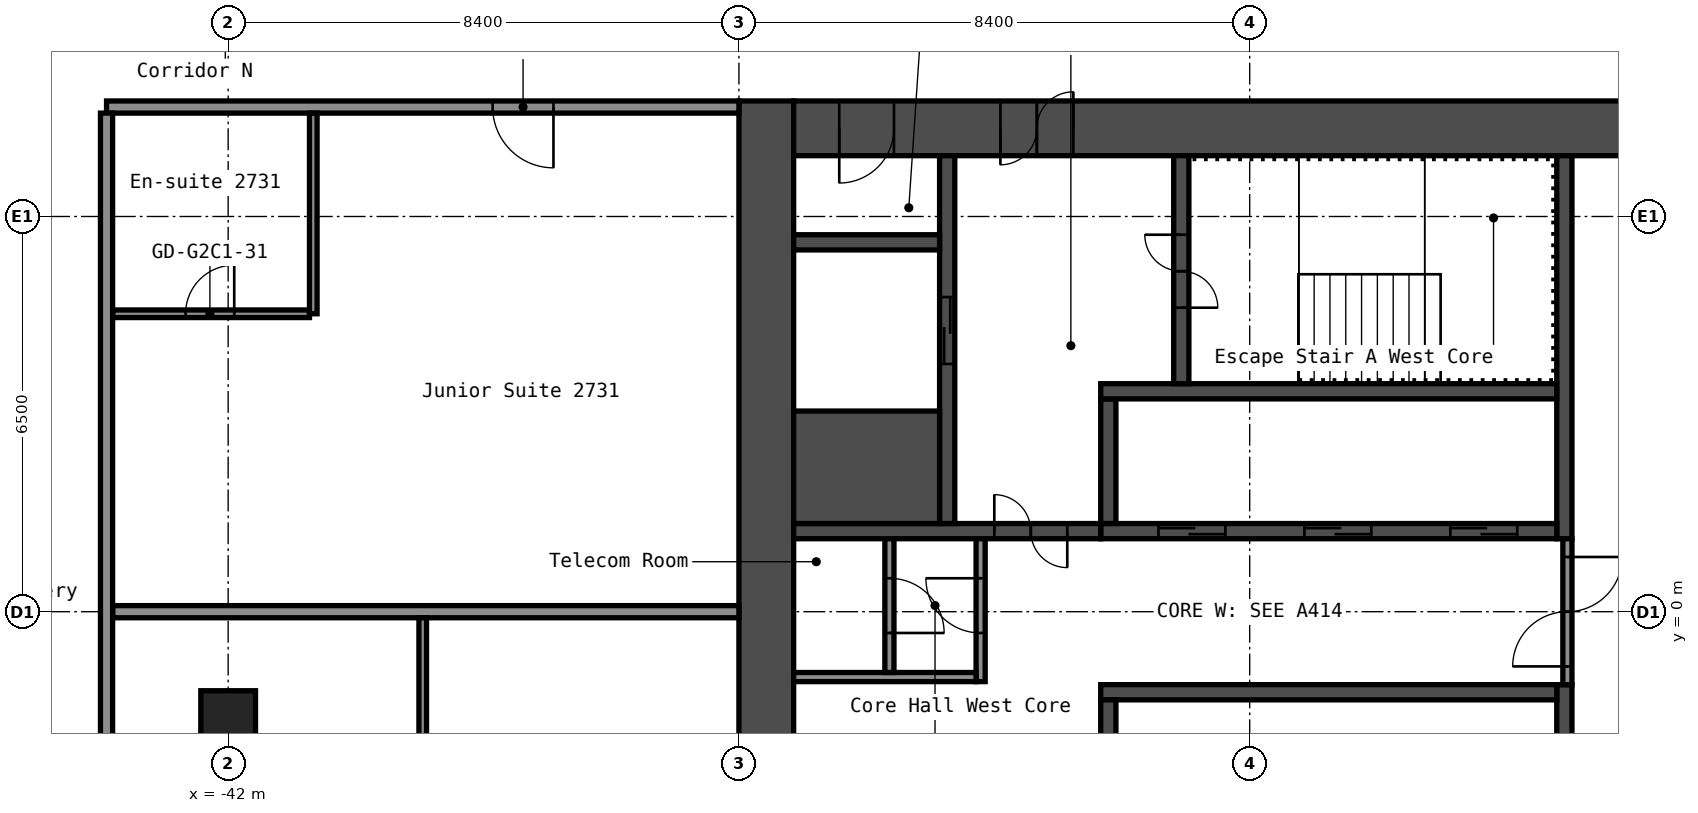
"""IFC4 building model, lengths in metres.
Left out: names, types, materials, properties, quantities, classifications, styles, units other than length and angle.
Written with IfcOpenShell. Run it as: python <this file> out.ifc"""

import sys

from ifc_helpers import new_model, si_unit, direction, frame, frame_2d, origin, origin_2d, place, context, subcontext, project, spatial, rectangle, hollow_rectangle, extrude, element, fill, save


model = new_model("IFC4")
c1 = context("Model", 3, precision=1e-05, world=origin(), true_north=direction((0.0, 1.0)))
c2 = subcontext(c1, "Body", "Model", "MODEL_VIEW")
j1 = project(units=[si_unit("LENGTHUNIT", "METRE"), si_unit("PLANEANGLEUNIT", "RADIAN")], contexts=[c1])
p1 = place(None, origin())
s1 = spatial("IfcSite", under=j1, at=p1, CompositionType="ELEMENT")
p2 = place(p1, origin())
s2 = spatial("IfcBuilding", under=s1, at=p2, CompositionType="ELEMENT")
p3 = place(p2, frame((0.0, 0.0, 97.8)))
s3 = spatial("IfcBuildingStorey", under=s2, at=p3, CompositionType="ELEMENT", Elevation=97.8)
p4 = place(p3, frame((-42.0, -1.75, 0.0), z_axis=(0.0, 0.0, 1.0), x_axis=(1.0, 0.0, 0.0)))
e1 = element("IfcColumn", 1, at=p4, inside=s3, PredefinedType="COLUMN", context=c2, shape_type="SweptSolid", body=[
    extrude(hollow_rectangle(XDim=0.9, YDim=0.9, WallThickness=0.036, at=origin_2d()), origin(), (0.0, 0.0, 1.0), 2.8),
])
p5 = place(p3, frame((-33.15, -8.4, 0.0), z_axis=(0.0, 0.0, 1.0), x_axis=(0.0, 1.0, 0.0)))
e2 = element("IfcWall", 2, at=p5, inside=s3, PredefinedType="SHEAR", context=c2, shape_type="SweptSolid", body=[
    extrude(rectangle(XDim=16.8, YDim=0.9, at=frame_2d((8.4, 0.0))), origin(), (0.0, 0.0, 1.0), 2.8),
])
p6 = place(p3, frame((-32.7, 7.95, 0.0), z_axis=(0.0, 0.0, 1.0), x_axis=(1.0, 0.0, 0.0)))
e3 = element("IfcWall", 3, at=p6, inside=s3, PredefinedType="SHEAR", context=c2, shape_type="SweptSolid", body=[
    extrude(rectangle(XDim=15.0, YDim=0.9, at=frame_2d((7.5, 0.0))), origin(), (0.0, 0.0, 1.0), 2.8),
])
p7 = place(p6, frame((3.4, 0.0, 0.0)))
e4 = element("IfcOpeningElement", 4, at=p7, cuts=e3, PredefinedType="OPENING", context=c2, shape_type="SweptSolid", body=[
    extrude(rectangle(XDim=1.2, YDim=2.1, at=frame_2d((0.6, 1.05))), frame((0.0, 0.46, 0.0), z_axis=(0.0, -1.0, 0.0), x_axis=(1.0, 0.0, 0.0)), (0.0, 0.0, 1.0), 0.92),
])
p8 = place(p6, frame((0.75, 0.0, 0.0)))
e5 = element("IfcOpeningElement", 5, at=p8, cuts=e3, PredefinedType="OPENING", context=c2, shape_type="SweptSolid", body=[
    extrude(rectangle(XDim=0.9, YDim=2.1, at=frame_2d((0.45, 1.05))), frame((0.0, 0.46, 0.0), z_axis=(0.0, -1.0, 0.0), x_axis=(1.0, 0.0, 0.0)), (0.0, 0.0, 1.0), 0.92),
])
p9 = place(p3, frame((-20.025, 1.2, 0.0), z_axis=(0.0, 0.0, 1.0), x_axis=(0.0, 1.0, 0.0)))
e6 = element("IfcWall", 6, at=p9, inside=s3, PredefinedType="SHEAR", context=c2, shape_type="SweptSolid", body=[
    extrude(rectangle(XDim=6.3, YDim=0.25, at=frame_2d((3.15, 0.0))), origin(), (0.0, 0.0, 1.0), 2.8),
])
p10 = place(p3, frame((-20.025, -7.5, 0.0), z_axis=(0.0, 0.0, 1.0), x_axis=(0.0, 1.0, 0.0)))
e7 = element("IfcWall", 7, at=p10, inside=s3, PredefinedType="SHEAR", context=c2, shape_type="SweptSolid", body=[
    extrude(rectangle(XDim=6.3, YDim=0.25, at=frame_2d((3.15, 0.0))), origin(), (0.0, 0.0, 1.0), 2.8),
])
p11 = place(p10, frame((2.4, 0.0, 0.0)))
e8 = element("IfcOpeningElement", 8, at=p11, cuts=e7, PredefinedType="OPENING", context=c2, shape_type="SweptSolid", body=[
    extrude(rectangle(XDim=1.0, YDim=2.1, at=frame_2d((0.5, 1.05))), frame((0.0, 0.135, 0.0), z_axis=(0.0, -1.0, 0.0), x_axis=(1.0, 0.0, 0.0)), (0.0, 0.0, 1.0), 0.27),
])
p12 = place(p3, frame((-27.65, 1.325, 0.0), z_axis=(0.0, 0.0, 1.0), x_axis=(1.0, 0.0, 0.0)))
e9 = element("IfcWall", 9, at=p12, inside=s3, PredefinedType="SHEAR", context=c2, shape_type="SweptSolid", body=[
    extrude(rectangle(XDim=7.5, YDim=0.25, at=frame_2d((3.75, 0.0))), origin(), (0.0, 0.0, 1.0), 2.8),
])
p13 = place(p12, frame((5.75, 0.0, 0.0)))
e10 = element("IfcOpeningElement", 10, at=p13, cuts=e9, PredefinedType="OPENING", context=c2, shape_type="SweptSolid", body=[
    extrude(rectangle(XDim=1.1, YDim=2.1, at=frame_2d((0.55, 1.05))), frame((0.0, 0.135, 0.0), z_axis=(0.0, -1.0, 0.0), x_axis=(1.0, 0.0, 0.0)), (0.0, 0.0, 1.0), 0.27),
])
p14 = place(p12, frame((3.35, 0.0, 0.0)))
e11 = element("IfcOpeningElement", 11, at=p14, cuts=e9, PredefinedType="OPENING", context=c2, shape_type="SweptSolid", body=[
    extrude(rectangle(XDim=1.1, YDim=2.1, at=frame_2d((0.55, 1.05))), frame((0.0, 0.135, 0.0), z_axis=(0.0, -1.0, 0.0), x_axis=(1.0, 0.0, 0.0)), (0.0, 0.0, 1.0), 0.27),
])
p15 = place(p12, frame((0.95, 0.0, 0.0)))
e12 = element("IfcOpeningElement", 12, at=p15, cuts=e9, PredefinedType="OPENING", context=c2, shape_type="SweptSolid", body=[
    extrude(rectangle(XDim=1.1, YDim=2.1, at=frame_2d((0.55, 1.05))), frame((0.0, 0.135, 0.0), z_axis=(0.0, -1.0, 0.0), x_axis=(1.0, 0.0, 0.0)), (0.0, 0.0, 1.0), 0.27),
])
p16 = place(p3, frame((-27.525, 1.45, 0.0), z_axis=(0.0, 0.0, 1.0), x_axis=(0.0, 1.0, 0.0)))
e13 = element("IfcWall", 13, at=p16, inside=s3, PredefinedType="SHEAR", context=c2, shape_type="SweptSolid", body=[
    extrude(rectangle(XDim=2.05, YDim=0.25, at=frame_2d((1.025, 0.0))), origin(), (0.0, 0.0, 1.0), 2.8),
])
p17 = place(p3, frame((-27.65, 3.625, 0.0), z_axis=(0.0, 0.0, 1.0), x_axis=(1.0, 0.0, 0.0)))
e14 = element("IfcWall", 14, at=p17, inside=s3, PredefinedType="SHEAR", context=c2, shape_type="SweptSolid", body=[
    extrude(rectangle(XDim=7.5, YDim=0.25, at=frame_2d((3.75, 0.0))), origin(), (0.0, 0.0, 1.0), 2.8),
])
p18 = place(p3, frame((-26.325, 3.75, 0.0), z_axis=(0.0, 0.0, 1.0), x_axis=(0.0, 1.0, 0.0)))
e15 = element("IfcWall", 15, at=p18, inside=s3, PredefinedType="SHEAR", context=c2, shape_type="SweptSolid", body=[
    extrude(rectangle(XDim=3.75, YDim=0.25, at=frame_2d((1.875, 0.0))), origin(), (0.0, 0.0, 1.0), 2.8),
])
p19 = place(p18, frame((1.25, 0.0, 0.0)))
e16 = element("IfcOpeningElement", 16, at=p19, cuts=e15, PredefinedType="OPENING", context=c2, shape_type="SweptSolid", body=[
    extrude(rectangle(XDim=1.2, YDim=2.1, at=frame_2d((0.6, 1.05))), frame((0.0, 0.135, 0.0), z_axis=(0.0, -1.0, 0.0), x_axis=(1.0, 0.0, 0.0)), (0.0, 0.0, 1.0), 0.27),
])
p20 = place(p3, frame((-32.7, 1.325, 0.0), z_axis=(0.0, 0.0, 1.0), x_axis=(1.0, 0.0, 0.0)))
e17 = element("IfcWall", 17, at=p20, inside=s3, PredefinedType="SHEAR", context=c2, shape_type="SweptSolid", body=[
    extrude(rectangle(XDim=5.05, YDim=0.25, at=frame_2d((2.525, 0.0))), origin(), (0.0, 0.0, 1.0), 2.8),
])
p21 = place(p20, frame((3.3, 0.0, 0.0)))
e18 = element("IfcOpeningElement", 18, at=p21, cuts=e17, PredefinedType="OPENING", context=c2, shape_type="SweptSolid", body=[
    extrude(rectangle(XDim=1.2, YDim=2.1, at=frame_2d((0.6, 1.05))), frame((0.0, 0.135, 0.0), z_axis=(0.0, -1.0, 0.0), x_axis=(1.0, 0.0, 0.0)), (0.0, 0.0, 1.0), 0.27),
])
p22 = place(p3, frame((-30.175, 1.45, 0.0), z_axis=(0.0, 0.0, 1.0), x_axis=(0.0, 1.0, 0.0)))
e19 = element("IfcWall", 19, at=p22, inside=s3, PredefinedType="SHEAR", context=c2, shape_type="SweptSolid", body=[
    extrude(rectangle(XDim=6.05, YDim=0.25, at=frame_2d((3.025, 0.0))), origin(), (0.0, 0.0, 1.0), 2.8),
])
p23 = place(p22, frame((2.625, 0.0, 0.0)))
e20 = element("IfcOpeningElement", 20, at=p23, cuts=e19, PredefinedType="OPENING", context=c2, shape_type="SweptSolid", body=[
    extrude(rectangle(XDim=1.1, YDim=2.1, at=frame_2d((0.55, 1.05))), frame((0.0, 0.135, 0.0), z_axis=(0.0, -1.0, 0.0), x_axis=(1.0, 0.0, 0.0)), (0.0, 0.0, 1.0), 0.27),
])
p24 = place(p3, frame((-32.7, 2.375, 0.0), z_axis=(0.0, 0.0, 1.0), x_axis=(1.0, 0.0, 0.0)))
e21 = element("IfcWall", 21, at=p24, inside=s3, PredefinedType="SHEAR", context=c2, shape_type="SweptSolid", body=[
    extrude(rectangle(XDim=2.4, YDim=1.85, at=frame_2d((1.2, 0.0))), origin(), (0.0, 0.0, 1.0), 2.8),
])
p25 = place(p3, frame((-32.7, 6.075, 0.0), z_axis=(0.0, 0.0, 1.0), x_axis=(1.0, 0.0, 0.0)))
e22 = element("IfcWall", 22, at=p25, inside=s3, PredefinedType="SHEAR", context=c2, shape_type="SweptSolid", body=[
    extrude(rectangle(XDim=2.4, YDim=0.25, at=frame_2d((1.2, 0.0))), origin(), (0.0, 0.0, 1.0), 2.8),
])
p26 = place(p3, frame((-27.65, -1.325, 0.0), z_axis=(0.0, 0.0, 1.0), x_axis=(1.0, 0.0, 0.0)))
e23 = element("IfcWall", 23, at=p26, inside=s3, PredefinedType="SHEAR", context=c2, shape_type="SweptSolid", body=[
    extrude(rectangle(XDim=7.5, YDim=0.25, at=frame_2d((3.75, 0.0))), origin(), (0.0, 0.0, 1.0), 2.8),
])
p27 = place(p3, frame((-27.525, -3.5, 0.0), z_axis=(0.0, 0.0, 1.0), x_axis=(0.0, 1.0, 0.0)))
e24 = element("IfcWall", 24, at=p27, inside=s3, PredefinedType="SHEAR", context=c2, shape_type="SweptSolid", body=[
    extrude(rectangle(XDim=2.05, YDim=0.25, at=frame_2d((1.025, 0.0))), origin(), (0.0, 0.0, 1.0), 2.8),
])
p28 = place(p3, frame((-19.975, -1.2, 0.0), z_axis=(0.0, 0.0, 1.0), x_axis=(0.0, 1.0, 0.0)))
e25 = element("IfcWall", 25, at=p28, inside=s3, PredefinedType="PARTITIONING", context=c2, shape_type="SweptSolid", body=[
    extrude(rectangle(XDim=2.4, YDim=0.15, at=frame_2d((1.2, 0.0))), origin(), (0.0, 0.0, 1.0), 2.8),
])
p29 = place(p28, frame((0.3, 0.0, 0.0)))
e26 = element("IfcOpeningElement", 26, at=p29, cuts=e25, PredefinedType="OPENING", context=c2, shape_type="SweptSolid", body=[
    extrude(rectangle(XDim=1.8, YDim=2.1, at=frame_2d((0.9, 1.05))), frame((0.0, 0.085, 0.0), z_axis=(0.0, -1.0, 0.0), x_axis=(1.0, 0.0, 0.0)), (0.0, 0.0, 1.0), 0.17),
])
p30 = place(p3, frame((-29.625, -1.15, 0.0), z_axis=(0.0, 0.0, 1.0), x_axis=(0.0, 1.0, 0.0)))
e27 = element("IfcWall", 27, at=p30, inside=s3, PredefinedType="PARTITIONING", context=c2, shape_type="SweptSolid", body=[
    extrude(rectangle(XDim=2.35, YDim=0.15, at=frame_2d((1.175, 0.0))), origin(), (0.0, 0.0, 1.0), 2.8),
])
p31 = place(p30, frame((0.8, 0.0, 0.0)))
e28 = element("IfcOpeningElement", 28, at=p31, cuts=e27, PredefinedType="OPENING", context=c2, shape_type="SweptSolid", body=[
    extrude(rectangle(XDim=0.9, YDim=2.1, at=frame_2d((0.45, 1.05))), frame((0.0, 0.085, 0.0), z_axis=(0.0, -1.0, 0.0), x_axis=(1.0, 0.0, 0.0)), (0.0, 0.0, 1.0), 0.17),
])
p32 = place(p3, frame((-32.7, -1.075, 0.0), z_axis=(0.0, 0.0, 1.0), x_axis=(1.0, 0.0, 0.0)))
e29 = element("IfcWall", 29, at=p32, inside=s3, PredefinedType="PARTITIONING", context=c2, shape_type="SweptSolid", body=[
    extrude(rectangle(XDim=3.0, YDim=0.15, at=frame_2d((1.5, 0.0))), origin(), (0.0, 0.0, 1.0), 2.8),
])
p33 = place(p3, frame((-31.125, -1.0, 0.0), z_axis=(0.0, 0.0, 1.0), x_axis=(0.0, 1.0, 0.0)))
e30 = element("IfcWall", 30, at=p33, inside=s3, PredefinedType="PARTITIONING", context=c2, shape_type="SweptSolid", body=[
    extrude(rectangle(XDim=2.2, YDim=0.15, at=frame_2d((1.1, 0.0))), origin(), (0.0, 0.0, 1.0), 2.8),
])
p34 = place(p33, frame((0.65, 0.0, 0.0)))
e31 = element("IfcOpeningElement", 31, at=p34, cuts=e30, PredefinedType="OPENING", context=c2, shape_type="SweptSolid", body=[
    extrude(rectangle(XDim=0.9, YDim=2.1, at=frame_2d((0.45, 1.05))), frame((0.0, 0.085, 0.0), z_axis=(0.0, -1.0, 0.0), x_axis=(1.0, 0.0, 0.0)), (0.0, 0.0, 1.0), 0.17),
])
p35 = place(p3, frame((-43.9, 0.0, 0.0), z_axis=(0.0, 0.0, 1.0), x_axis=(1.0, 0.0, 0.0)))
e32 = element("IfcWall", 32, at=p35, inside=s3, PredefinedType="PARTITIONING", context=c2, shape_type="SweptSolid", body=[
    extrude(rectangle(XDim=10.3, YDim=0.2, at=frame_2d((5.15, 0.0))), origin(), (0.0, 0.0, 1.0), 2.8),
])
p36 = place(p3, frame((-43.9, 4.9, 0.0), z_axis=(0.0, 0.0, 1.0), x_axis=(1.0, 0.0, 0.0)))
e33 = element("IfcWall", 33, at=p36, inside=s3, PredefinedType="PARTITIONING", context=c2, shape_type="SweptSolid", body=[
    extrude(rectangle(XDim=3.237, YDim=0.125, at=frame_2d((1.619, 0.0))), origin(), (0.0, 0.0, 1.0), 2.8),
])
p37 = place(p36, frame((1.2, 0.0, 0.0)))
e34 = element("IfcOpeningElement", 34, at=p37, cuts=e33, PredefinedType="OPENING", context=c2, shape_type="SweptSolid", body=[
    extrude(rectangle(XDim=0.8, YDim=2.1, at=frame_2d((0.4, 1.05))), frame((0.0, 0.073, 0.0), z_axis=(0.0, -1.0, 0.0), x_axis=(1.0, 0.0, 0.0)), (0.0, 0.0, 1.0), 0.145),
])
p38 = place(p3, frame((-44.0, 8.3, 0.0), z_axis=(0.0, 0.0, 1.0), x_axis=(1.0, 0.0, 0.0)))
e35 = element("IfcWall", 35, at=p38, inside=s3, PredefinedType="PARTITIONING", context=c2, shape_type="SweptSolid", body=[
    extrude(rectangle(XDim=10.4, YDim=0.2, at=frame_2d((5.2, 0.0))), origin(), (0.0, 0.0, 1.0), 2.8),
])
p39 = place(p38, frame((6.35, 0.0, 0.0)))
e36 = element("IfcOpeningElement", 36, at=p39, cuts=e35, PredefinedType="OPENING", context=c2, shape_type="SweptSolid", body=[
    extrude(rectangle(XDim=1.0, YDim=2.1, at=frame_2d((0.5, 1.05))), frame((0.0, 0.11, 0.0), z_axis=(0.0, -1.0, 0.0), x_axis=(1.0, 0.0, 0.0)), (0.0, 0.0, 1.0), 0.22),
])
p40 = place(p3, frame((-44.0, -8.2, 0.0), z_axis=(0.0, 0.0, 1.0), x_axis=(0.0, 1.0, 0.0)))
e37 = element("IfcWall", 37, at=p40, inside=s3, PredefinedType="PARTITIONING", context=c2, shape_type="SweptSolid", body=[
    extrude(rectangle(XDim=16.4, YDim=0.2, at=frame_2d((8.2, 0.0))), origin(), (0.0, 0.0, 1.0), 2.8),
])
p41 = place(p3, frame((-40.6, 4.9, 0.0), z_axis=(0.0, 0.0, 1.0), x_axis=(0.0, 1.0, 0.0)))
e38 = element("IfcWall", 38, at=p41, inside=s3, PredefinedType="PARTITIONING", context=c2, shape_type="SweptSolid", body=[
    extrude(rectangle(XDim=3.3, YDim=0.125, at=frame_2d((1.65, 0.0))), origin(), (0.0, 0.0, 1.0), 2.8),
])
p42 = place(p3, frame((-38.8, -8.2, 0.0), z_axis=(0.0, 0.0, 1.0), x_axis=(0.0, 1.0, 0.0)))
e39 = element("IfcWall", 39, at=p42, inside=s3, PredefinedType="PARTITIONING", context=c2, shape_type="SweptSolid", body=[
    extrude(rectangle(XDim=8.1, YDim=0.125, at=frame_2d((4.05, 0.0))), origin(), (0.0, 0.0, 1.0), 2.8),
])
p43 = place(p42, frame((4.05, 0.0, 0.0)))
e40 = element("IfcOpeningElement", 40, at=p43, cuts=e39, PredefinedType="OPENING", context=c2, shape_type="SweptSolid", body=[
    extrude(rectangle(XDim=0.9, YDim=2.1, at=frame_2d((0.45, 1.05))), frame((0.0, 0.073, 0.0), z_axis=(0.0, -1.0, 0.0), x_axis=(1.0, 0.0, 0.0)), (0.0, 0.0, 1.0), 0.145),
])
p44 = place(p7, origin())
e41 = element("IfcDoor", 41, at=p44, inside=s3, OperationType="DOUBLE_DOOR_SINGLE_SWING", PredefinedType="DOOR", context=c2, shape_type="SweptSolid", body=[
    extrude(rectangle(XDim=1.2, YDim=2.1, at=frame_2d((0.6, 1.05))), frame((0.0, 0.025, 0.0), z_axis=(0.0, -1.0, 0.0), x_axis=(1.0, 0.0, 0.0)), (0.0, 0.0, 1.0), 0.05),
])
fill(e4, e41)
p45 = place(p8, origin())
e42 = element("IfcDoor", 42, at=p45, inside=s3, OperationType="SINGLE_SWING_LEFT", PredefinedType="DOOR", context=c2, shape_type="SweptSolid", body=[
    extrude(rectangle(XDim=0.9, YDim=2.1, at=frame_2d((0.45, 1.05))), frame((0.0, 0.025, 0.0), z_axis=(0.0, -1.0, 0.0), x_axis=(1.0, 0.0, 0.0)), (0.0, 0.0, 1.0), 0.05),
])
fill(e5, e42)
p46 = place(p19, origin())
e43 = element("IfcDoor", 43, at=p46, inside=s3, OperationType="DOUBLE_DOOR_SINGLE_SWING", PredefinedType="DOOR", context=c2, shape_type="SweptSolid", body=[
    extrude(rectangle(XDim=1.2, YDim=2.1, at=frame_2d((0.6, 1.05))), frame((0.0, 0.025, 0.0), z_axis=(0.0, -1.0, 0.0), x_axis=(1.0, 0.0, 0.0)), (0.0, 0.0, 1.0), 0.05),
])
fill(e16, e43)
p47 = place(p21, origin())
e44 = element("IfcDoor", 44, at=p47, inside=s3, OperationType="DOUBLE_DOOR_SINGLE_SWING", PredefinedType="DOOR", context=c2, shape_type="SweptSolid", body=[
    extrude(rectangle(XDim=1.2, YDim=2.1, at=frame_2d((0.6, 1.05))), frame((0.0, 0.025, 0.0), z_axis=(0.0, -1.0, 0.0), x_axis=(1.0, 0.0, 0.0)), (0.0, 0.0, 1.0), 0.05),
])
fill(e18, e44)
p48 = place(p29, origin())
e45 = element("IfcDoor", 45, at=p48, inside=s3, OperationType="DOUBLE_DOOR_SINGLE_SWING", PredefinedType="DOOR", context=c2, shape_type="SweptSolid", body=[
    extrude(rectangle(XDim=1.8, YDim=2.1, at=frame_2d((0.9, 1.05))), frame((0.0, 0.025, 0.0), z_axis=(0.0, -1.0, 0.0), x_axis=(1.0, 0.0, 0.0)), (0.0, 0.0, 1.0), 0.05),
])
fill(e26, e45)
p49 = place(p31, origin())
e46 = element("IfcDoor", 46, at=p49, inside=s3, OperationType="SINGLE_SWING_LEFT", PredefinedType="DOOR", context=c2, shape_type="SweptSolid", body=[
    extrude(rectangle(XDim=0.9, YDim=2.1, at=frame_2d((0.45, 1.05))), frame((0.0, 0.025, 0.0), z_axis=(0.0, -1.0, 0.0), x_axis=(1.0, 0.0, 0.0)), (0.0, 0.0, 1.0), 0.05),
])
fill(e28, e46)
p50 = place(p34, origin())
e47 = element("IfcDoor", 47, at=p50, inside=s3, OperationType="SINGLE_SWING_LEFT", PredefinedType="DOOR", context=c2, shape_type="SweptSolid", body=[
    extrude(rectangle(XDim=0.9, YDim=2.1, at=frame_2d((0.45, 1.05))), frame((0.0, 0.025, 0.0), z_axis=(0.0, -1.0, 0.0), x_axis=(1.0, 0.0, 0.0)), (0.0, 0.0, 1.0), 0.05),
])
fill(e31, e47)
p51 = place(p13, origin())
e48 = element("IfcDoor", 48, at=p51, inside=s3, OperationType="DOUBLE_DOOR_SLIDING", PredefinedType="DOOR", context=c2, shape_type="SweptSolid", body=[
    extrude(rectangle(XDim=1.1, YDim=2.1, at=frame_2d((0.55, 1.05))), frame((0.0, 0.025, 0.0), z_axis=(0.0, -1.0, 0.0), x_axis=(1.0, 0.0, 0.0)), (0.0, 0.0, 1.0), 0.05),
])
fill(e10, e48)
p52 = place(p14, origin())
e49 = element("IfcDoor", 49, at=p52, inside=s3, OperationType="DOUBLE_DOOR_SLIDING", PredefinedType="DOOR", context=c2, shape_type="SweptSolid", body=[
    extrude(rectangle(XDim=1.1, YDim=2.1, at=frame_2d((0.55, 1.05))), frame((0.0, 0.025, 0.0), z_axis=(0.0, -1.0, 0.0), x_axis=(1.0, 0.0, 0.0)), (0.0, 0.0, 1.0), 0.05),
])
fill(e11, e49)
p53 = place(p15, origin())
e50 = element("IfcDoor", 50, at=p53, inside=s3, OperationType="DOUBLE_DOOR_SLIDING", PredefinedType="DOOR", context=c2, shape_type="SweptSolid", body=[
    extrude(rectangle(XDim=1.1, YDim=2.1, at=frame_2d((0.55, 1.05))), frame((0.0, 0.025, 0.0), z_axis=(0.0, -1.0, 0.0), x_axis=(1.0, 0.0, 0.0)), (0.0, 0.0, 1.0), 0.05),
])
fill(e12, e50)
p54 = place(p23, origin())
e51 = element("IfcDoor", 51, at=p54, inside=s3, OperationType="DOUBLE_DOOR_SLIDING", PredefinedType="DOOR", context=c2, shape_type="SweptSolid", body=[
    extrude(rectangle(XDim=1.1, YDim=2.1, at=frame_2d((0.55, 1.05))), frame((0.0, 0.025, 0.0), z_axis=(0.0, -1.0, 0.0), x_axis=(1.0, 0.0, 0.0)), (0.0, 0.0, 1.0), 0.05),
])
fill(e20, e51)
p55 = place(p37, origin())
e52 = element("IfcDoor", 52, at=p55, inside=s3, OperationType="SINGLE_SWING_LEFT", PredefinedType="DOOR", context=c2, shape_type="SweptSolid", body=[
    extrude(rectangle(XDim=0.8, YDim=2.1, at=frame_2d((0.4, 1.05))), frame((0.0, 0.025, 0.0), z_axis=(0.0, -1.0, 0.0), x_axis=(1.0, 0.0, 0.0)), (0.0, 0.0, 1.0), 0.05),
])
fill(e34, e52)
p56 = place(p39, origin())
e53 = element("IfcDoor", 53, at=p56, inside=s3, OperationType="SINGLE_SWING_RIGHT", PredefinedType="DOOR", context=c2, shape_type="SweptSolid", body=[
    extrude(rectangle(XDim=1.0, YDim=2.1, at=frame_2d((0.5, 1.05))), frame((0.0, 0.025, 0.0), z_axis=(0.0, -1.0, 0.0), x_axis=(1.0, 0.0, 0.0)), (0.0, 0.0, 1.0), 0.05),
])
fill(e36, e53)
save(model, sys.argv[1])
